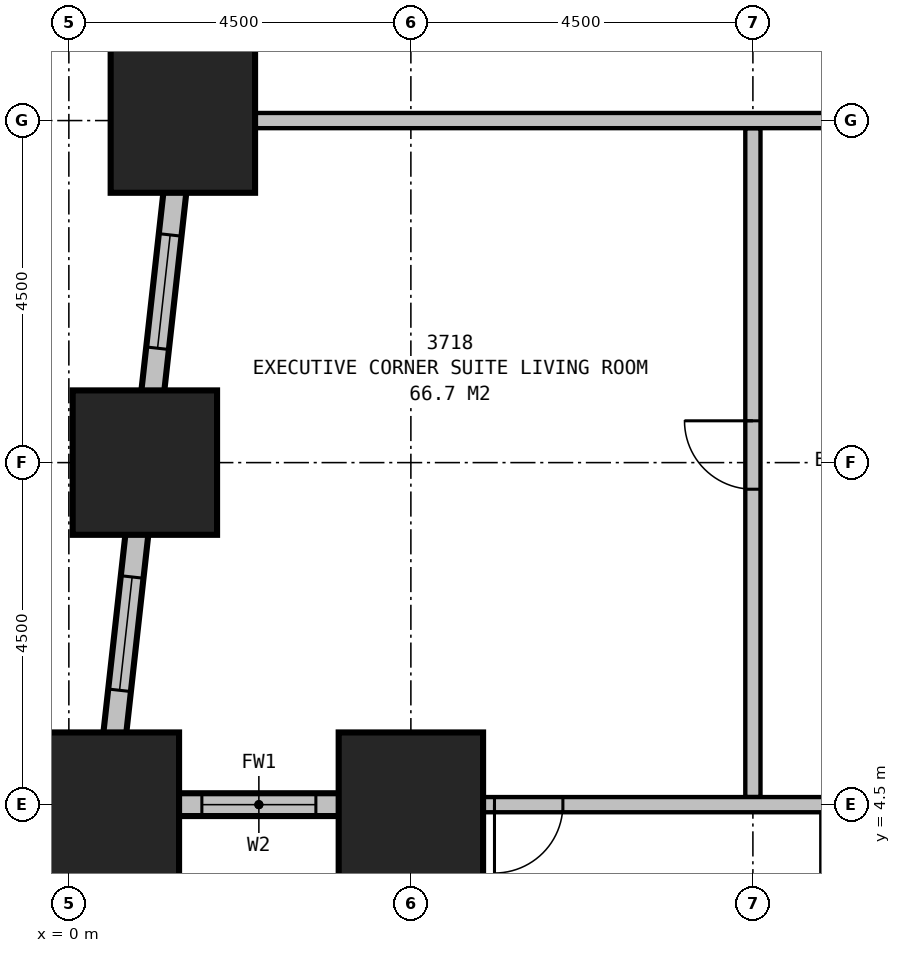
"""IFC4 building model, lengths in metres.
Left out: names, types, materials, properties, quantities, classifications, styles, units other than length and angle.
Written with IfcOpenShell. Run it as: python <this file> out.ifc"""

import sys

from ifc_helpers import new_model, si_unit, direction, frame, frame_2d, origin, origin_2d, place, context, subcontext, project, spatial, rectangle, extrude, element, fill, save


model = new_model("IFC4")
c1 = context("Model", 3, precision=1e-05, world=origin(), true_north=direction((0.0, 1.0)))
c2 = subcontext(c1, "Body", "Model", "MODEL_VIEW")
j1 = project(units=[si_unit("LENGTHUNIT", "METRE"), si_unit("PLANEANGLEUNIT", "RADIAN")], contexts=[c1])
p1 = place(None, origin())
s1 = spatial("IfcSite", under=j1, at=p1, CompositionType="ELEMENT")
p2 = place(p1, origin())
s2 = spatial("IfcBuilding", under=s1, at=p2, CompositionType="ELEMENT")
p3 = place(p2, frame((0.0, 0.0, 142.4)))
s3 = spatial("IfcBuildingStorey", under=s2, at=p3, CompositionType="ELEMENT", Elevation=142.4)
for number, where, z_axis, x_axis in (
    (1, (0.5, 4.5, 0.0), (0.0, 0.0, 1.0), (1.0, 0.0, 0.0)),
    (2, (4.5, 4.5, 0.0), (0.0, 0.0, 1.0), (1.0, 0.0, 0.0)),
    (3, (1.5, 13.5, 0.0), (0.0, 0.0, 1.0), (1.0, 0.0, 0.0)),
    (4, (1.0, 9.0, 0.0), (0.0, 0.0, 1.0), (1.0, 0.0, 0.0)),
):
    element("IfcColumn", number, at=place(p3, frame(where, z_axis=z_axis, x_axis=x_axis)), inside=s3, PredefinedType="COLUMN", context=c2, shape_type="SweptSolid", body=[
        extrude(rectangle(XDim=1.9, YDim=1.9, at=origin_2d()), origin(), (0.0, 0.0, 1.0), 3.5),
    ])
p4 = place(p3, frame((0.35, 4.5, 0.0), z_axis=(0.0, 0.0, 1.0), x_axis=(1.0, 0.0, 0.0)))
e5 = element("IfcWall", 5, at=p4, inside=s3, PredefinedType="STANDARD", context=c2, shape_type="SweptSolid", body=[
    extrude(rectangle(XDim=4.3, YDim=0.3, at=frame_2d((2.15, 0.0))), origin(), (0.0, 0.0, 1.0), 2.1),
])
p5 = place(p4, frame((1.4, 0.0, 0.5)))
e6 = element("IfcOpeningElement", 6, at=p5, cuts=e5, PredefinedType="OPENING", context=c2, shape_type="SweptSolid", body=[
    extrude(rectangle(XDim=1.5, YDim=1.4, at=frame_2d((0.75, 0.7))), frame((0.0, 0.16, 0.0), z_axis=(0.0, -1.0, 0.0), x_axis=(1.0, 0.0, 0.0)), (0.0, 0.0, 1.0), 0.32),
])
p6 = place(p3, frame((4.5, 4.65, 0.0), z_axis=(0.0, 0.0, 1.0), x_axis=(0.0, -1.0, 0.0)))
e7 = element("IfcWall", 7, at=p6, inside=s3, PredefinedType="STANDARD", context=c2, shape_type="SweptSolid", body=[
    extrude(rectangle(XDim=4.8, YDim=0.3, at=frame_2d((2.4, 0.0))), origin(), (0.0, 0.0, 1.0), 2.1),
])
p7 = place(p6, frame((1.65, 0.0, 0.5)))
e8 = element("IfcOpeningElement", 8, at=p7, cuts=e7, PredefinedType="OPENING", context=c2, shape_type="SweptSolid", body=[
    extrude(rectangle(XDim=1.5, YDim=1.4, at=frame_2d((0.75, 0.7))), frame((0.0, 0.16, 0.0), z_axis=(0.0, -1.0, 0.0), x_axis=(1.0, 0.0, 0.0)), (0.0, 0.0, 1.0), 0.32),
])
p8 = place(p3, frame((4.017, 36.149, 0.0), z_axis=(0.0, 0.0, 1.0), x_axis=(-0.110433201132, -0.993883548555, 0.0)))
e9 = element("IfcWall", 9, at=p8, inside=s3, PredefinedType="STANDARD", context=c2, shape_type="SweptSolid", body=[
    extrude(rectangle(XDim=31.994, YDim=0.3, at=frame_2d((15.997, 0.0))), origin(), (0.0, 0.0, 1.0), 2.1),
])
p9 = place(p8, frame((1.664, 0.0, 0.5)))
e10 = element("IfcOpeningElement", 10, at=p9, cuts=e9, PredefinedType="OPENING", context=c2, shape_type="SweptSolid", body=[
    extrude(rectangle(XDim=1.5, YDim=1.4, at=frame_2d((0.75, 0.7))), frame((0.0, 0.16, 0.0), z_axis=(0.0, -1.0, 0.0), x_axis=(1.0, 0.0, 0.0)), (0.0, 0.0, 1.0), 0.32),
])
p10 = place(p8, frame((6.192, 0.0, 0.5)))
e11 = element("IfcOpeningElement", 11, at=p10, cuts=e9, PredefinedType="OPENING", context=c2, shape_type="SweptSolid", body=[
    extrude(rectangle(XDim=1.5, YDim=1.4, at=frame_2d((0.75, 0.7))), frame((0.0, 0.16, 0.0), z_axis=(0.0, -1.0, 0.0), x_axis=(1.0, 0.0, 0.0)), (0.0, 0.0, 1.0), 0.32),
])
p11 = place(p8, frame((10.719, 0.0, 0.5)))
e12 = element("IfcOpeningElement", 12, at=p11, cuts=e9, PredefinedType="OPENING", context=c2, shape_type="SweptSolid", body=[
    extrude(rectangle(XDim=1.5, YDim=1.4, at=frame_2d((0.75, 0.7))), frame((0.0, 0.16, 0.0), z_axis=(0.0, -1.0, 0.0), x_axis=(1.0, 0.0, 0.0)), (0.0, 0.0, 1.0), 0.32),
])
p12 = place(p8, frame((15.247, 0.0, 0.5)))
e13 = element("IfcOpeningElement", 13, at=p12, cuts=e9, PredefinedType="OPENING", context=c2, shape_type="SweptSolid", body=[
    extrude(rectangle(XDim=1.5, YDim=1.4, at=frame_2d((0.75, 0.7))), frame((0.0, 0.16, 0.0), z_axis=(0.0, -1.0, 0.0), x_axis=(1.0, 0.0, 0.0)), (0.0, 0.0, 1.0), 0.32),
])
p13 = place(p8, frame((19.775, 0.0, 0.5)))
e14 = element("IfcOpeningElement", 14, at=p13, cuts=e9, PredefinedType="OPENING", context=c2, shape_type="SweptSolid", body=[
    extrude(rectangle(XDim=1.5, YDim=1.4, at=frame_2d((0.75, 0.7))), frame((0.0, 0.16, 0.0), z_axis=(0.0, -1.0, 0.0), x_axis=(1.0, 0.0, 0.0)), (0.0, 0.0, 1.0), 0.32),
])
p14 = place(p8, frame((24.302, 0.0, 0.5)))
e15 = element("IfcOpeningElement", 15, at=p14, cuts=e9, PredefinedType="OPENING", context=c2, shape_type="SweptSolid", body=[
    extrude(rectangle(XDim=1.5, YDim=1.4, at=frame_2d((0.75, 0.7))), frame((0.0, 0.16, 0.0), z_axis=(0.0, -1.0, 0.0), x_axis=(1.0, 0.0, 0.0)), (0.0, 0.0, 1.0), 0.32),
])
p15 = place(p8, frame((28.83, 0.0, 0.5)))
e16 = element("IfcOpeningElement", 16, at=p15, cuts=e9, PredefinedType="OPENING", context=c2, shape_type="SweptSolid", body=[
    extrude(rectangle(XDim=1.5, YDim=1.4, at=frame_2d((0.75, 0.7))), frame((0.0, 0.16, 0.0), z_axis=(0.0, -1.0, 0.0), x_axis=(1.0, 0.0, 0.0)), (0.0, 0.0, 1.0), 0.32),
])
p16 = place(p3, frame((11.2, 13.5, 0.0), z_axis=(0.0, 0.0, 1.0), x_axis=(-1.0, 0.0, 0.0)))
e17 = element("IfcWall", 17, at=p16, inside=s3, PredefinedType="PARTITIONING", context=c2, shape_type="SweptSolid", body=[
    extrude(rectangle(XDim=9.921, YDim=0.2, at=frame_2d((4.96, 0.0))), origin(), (0.0, 0.0, 1.0), 1.9),
])
p17 = place(p3, frame((13.6, 4.5, 0.0), z_axis=(0.0, 0.0, 1.0), x_axis=(-1.0, 0.0, 0.0)))
e18 = element("IfcWall", 18, at=p17, inside=s3, PredefinedType="PARTITIONING", context=c2, shape_type="SweptSolid", body=[
    extrude(rectangle(XDim=9.1, YDim=0.2, at=frame_2d((4.55, 0.0))), origin(), (0.0, 0.0, 1.0), 3.25),
])
p18 = place(p17, frame((7.1, 0.0, 0.0)))
e19 = element("IfcOpeningElement", 19, at=p18, cuts=e18, PredefinedType="OPENING", context=c2, shape_type="SweptSolid", body=[
    extrude(rectangle(XDim=0.9, YDim=2.1, at=frame_2d((0.45, 1.05))), frame((0.0, 0.11, 0.0), z_axis=(0.0, -1.0, 0.0), x_axis=(1.0, 0.0, 0.0)), (0.0, 0.0, 1.0), 0.22),
])
p19 = place(p3, frame((9.0, 4.6, 0.0), z_axis=(0.0, 0.0, 1.0), x_axis=(0.0, 1.0, 0.0)))
e20 = element("IfcWall", 20, at=p19, inside=s3, PredefinedType="PARTITIONING", context=c2, shape_type="SweptSolid", body=[
    extrude(rectangle(XDim=8.8, YDim=0.2, at=frame_2d((4.4, 0.0))), origin(), (0.0, 0.0, 1.0), 2.2),
])
p20 = place(p19, frame((4.05, 0.0, 0.0)))
e21 = element("IfcOpeningElement", 21, at=p20, cuts=e20, PredefinedType="OPENING", context=c2, shape_type="SweptSolid", body=[
    extrude(rectangle(XDim=0.9, YDim=2.1, at=frame_2d((0.45, 1.05))), frame((0.0, 0.11, 0.0), z_axis=(0.0, -1.0, 0.0), x_axis=(1.0, 0.0, 0.0)), (0.0, 0.0, 1.0), 0.22),
])
p21 = place(p5, origin())
e22 = element("IfcWindow", 22, at=p21, inside=s3, PartitioningType="SINGLE_PANEL", PredefinedType="WINDOW", context=c2, shape_type="SweptSolid", body=[
    extrude(rectangle(XDim=1.5, YDim=1.4, at=frame_2d((0.75, 0.7))), frame((0.0, 0.03, 0.0), z_axis=(0.0, -1.0, 0.0), x_axis=(1.0, 0.0, 0.0)), (0.0, 0.0, 1.0), 0.06),
])
fill(e6, e22)
p22 = place(p14, origin())
e23 = element("IfcWindow", 23, at=p22, inside=s3, PartitioningType="SINGLE_PANEL", PredefinedType="WINDOW", context=c2, shape_type="SweptSolid", body=[
    extrude(rectangle(XDim=1.5, YDim=1.4, at=frame_2d((0.75, 0.7))), frame((0.0, 0.03, 0.0), z_axis=(0.0, -1.0, 0.0), x_axis=(1.0, 0.0, 0.0)), (0.0, 0.0, 1.0), 0.06),
])
fill(e15, e23)
p23 = place(p15, origin())
e24 = element("IfcWindow", 24, at=p23, inside=s3, PartitioningType="SINGLE_PANEL", PredefinedType="WINDOW", context=c2, shape_type="SweptSolid", body=[
    extrude(rectangle(XDim=1.5, YDim=1.4, at=frame_2d((0.75, 0.7))), frame((0.0, 0.03, 0.0), z_axis=(0.0, -1.0, 0.0), x_axis=(1.0, 0.0, 0.0)), (0.0, 0.0, 1.0), 0.06),
])
fill(e16, e24)
p24 = place(p18, origin())
e25 = element("IfcDoor", 25, at=p24, inside=s3, OperationType="SINGLE_SWING_RIGHT", PredefinedType="DOOR", context=c2, shape_type="SweptSolid", body=[
    extrude(rectangle(XDim=0.9, YDim=2.1, at=frame_2d((0.45, 1.05))), frame((0.0, 0.025, 0.0), z_axis=(0.0, -1.0, 0.0), x_axis=(1.0, 0.0, 0.0)), (0.0, 0.0, 1.0), 0.05),
])
fill(e19, e25)
p25 = place(p20, origin())
e26 = element("IfcDoor", 26, at=p25, inside=s3, OperationType="SINGLE_SWING_RIGHT", PredefinedType="DOOR", context=c2, shape_type="SweptSolid", body=[
    extrude(rectangle(XDim=0.9, YDim=2.1, at=frame_2d((0.45, 1.05))), frame((0.0, 0.025, 0.0), z_axis=(0.0, -1.0, 0.0), x_axis=(1.0, 0.0, 0.0)), (0.0, 0.0, 1.0), 0.05),
])
fill(e21, e26)
save(model, sys.argv[1])
